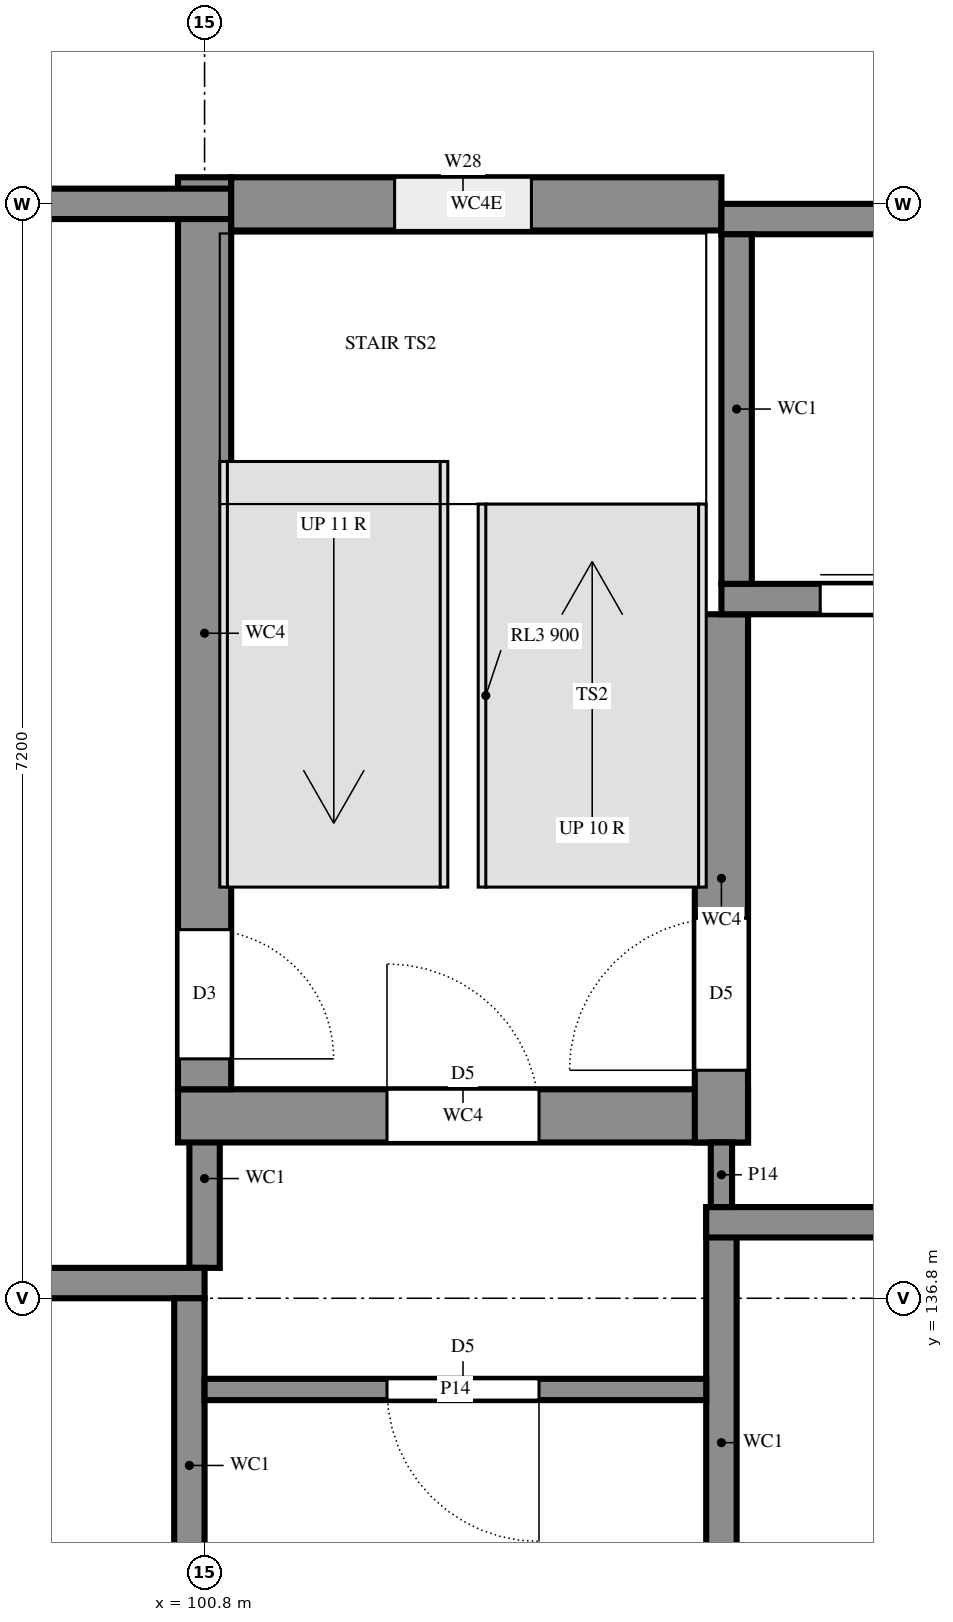
"""IFC4 building model, lengths in metres.
Left out: names, types, materials, properties, quantities, classifications, styles, units other than length and angle.
Written with IfcOpenShell. Run it as: python <this file> out.ifc"""

import sys

from ifc_helpers import new_model, si_unit, direction, frame, frame_2d, origin, place, context, subcontext, project, spatial, rectangle, extrude, element, fill, save


model = new_model("IFC4")
c1 = context("Model", 3, precision=1e-05, world=origin(), true_north=direction((0.0, 1.0)))
c2 = subcontext(c1, "Body", "Model", "MODEL_VIEW")
j1 = project(units=[si_unit("LENGTHUNIT", "METRE"), si_unit("PLANEANGLEUNIT", "RADIAN")], contexts=[c1])
p1 = place(None, origin())
s1 = spatial("IfcSite", under=j1, at=p1, CompositionType="ELEMENT")
p2 = place(p1, origin())
s2 = spatial("IfcBuilding", under=s1, at=p2, CompositionType="ELEMENT")
p3 = place(p2, frame((0.0, 0.0, 10.8)))
s3 = spatial("IfcBuildingStorey", under=s2, at=p3, CompositionType="ELEMENT", Elevation=10.8)
p4 = place(p3, frame((100.8, 137.0, 0.0), z_axis=(0.0, 0.0, 1.0), x_axis=(0.0, 1.0, 0.0)))
e1 = element("IfcWall", 1, at=p4, inside=s3, PredefinedType="SHEAR", context=c2, shape_type="SweptSolid", body=[
    extrude(rectangle(XDim=1.175, YDim=0.2, at=frame_2d((0.587, 0.0))), origin(), (0.0, 0.0, 1.0), 3.6),
])
p5 = place(p3, frame((104.2, 137.4, 0.0), z_axis=(0.0, 0.0, 1.0), x_axis=(0.0, -1.0, 0.0)))
e2 = element("IfcWall", 2, at=p5, inside=s3, PredefinedType="SHEAR", context=c2, shape_type="SweptSolid", body=[
    extrude(rectangle(XDim=3.1, YDim=0.2, at=frame_2d((1.55, 0.0))), origin(), (0.0, 0.0, 1.0), 3.6),
])
p6 = place(p3, frame((108.2, 137.3, 0.0), z_axis=(0.0, 0.0, 1.0), x_axis=(-1.0, 0.0, 0.0)))
e3 = element("IfcWall", 3, at=p6, inside=s3, PredefinedType="SHEAR", context=c2, shape_type="SweptSolid", body=[
    extrude(rectangle(XDim=4.1, YDim=0.2, at=frame_2d((2.05, 0.0))), origin(), (0.0, 0.0, 1.0), 3.6),
])
p7 = place(p3, frame((100.625, 138.0, 0.0), z_axis=(0.0, 0.0, 1.0), x_axis=(1.0, 0.0, 0.0)))
e4 = element("IfcWall", 4, at=p7, inside=s3, PredefinedType="SHEAR", context=c2, shape_type="SweptSolid", body=[
    extrude(rectangle(XDim=3.75, YDim=0.35, at=frame_2d((1.875, 0.0))), origin(), (0.0, 0.0, 1.0), 3.6),
])
p8 = place(p7, frame((1.375, 0.0, 0.0)))
e5 = element("IfcOpeningElement", 5, at=p8, cuts=e4, PredefinedType="OPENING", context=c2, shape_type="SweptSolid", body=[
    extrude(rectangle(XDim=1.0, YDim=2.1, at=frame_2d((0.5, 1.05))), frame((0.0, 0.185, 0.0), z_axis=(0.0, -1.0, 0.0), x_axis=(1.0, 0.0, 0.0)), (0.0, 0.0, 1.0), 0.37),
])
p9 = place(p3, frame((104.2, 137.825, 0.0), z_axis=(0.0, 0.0, 1.0), x_axis=(0.0, 1.0, 0.0)))
e6 = element("IfcWall", 6, at=p9, inside=s3, PredefinedType="SHEAR", context=c2, shape_type="SweptSolid", body=[
    extrude(rectangle(XDim=3.475, YDim=0.35, at=frame_2d((1.738, 0.0))), origin(), (0.0, 0.0, 1.0), 3.6),
])
p10 = place(p9, frame((0.475, 0.0, 0.0)))
e7 = element("IfcOpeningElement", 7, at=p10, cuts=e6, PredefinedType="OPENING", context=c2, shape_type="SweptSolid", body=[
    extrude(rectangle(XDim=1.0, YDim=2.1, at=frame_2d((0.5, 1.05))), frame((0.0, 0.185, 0.0), z_axis=(0.0, -1.0, 0.0), x_axis=(1.0, 0.0, 0.0)), (0.0, 0.0, 1.0), 0.37),
])
p11 = place(p3, frame((100.8, 144.175, 0.0), z_axis=(0.0, 0.0, 1.0), x_axis=(0.0, -1.0, 0.0)))
e8 = element("IfcWall", 8, at=p11, inside=s3, PredefinedType="SHEAR", context=c2, shape_type="SweptSolid", body=[
    extrude(rectangle(XDim=6.0, YDim=0.35, at=frame_2d((3.0, 0.0))), origin(), (0.0, 0.0, 1.0), 3.6),
])
p12 = place(p11, frame((4.95, 0.0, 0.0)))
e9 = element("IfcOpeningElement", 9, at=p12, cuts=e8, PredefinedType="OPENING", context=c2, shape_type="SweptSolid", body=[
    extrude(rectangle(XDim=0.85, YDim=2.1, at=frame_2d((0.425, 1.05))), frame((0.0, 0.185, 0.0), z_axis=(0.0, -1.0, 0.0), x_axis=(1.0, 0.0, 0.0)), (0.0, 0.0, 1.0), 0.37),
])
p13 = place(p3, frame((100.975, 144.0, 0.0), z_axis=(0.0, 0.0, 1.0), x_axis=(-1.0, 0.0, 0.0)))
e10 = element("IfcWall", 10, at=p13, inside=s3, PredefinedType="SHEAR", context=c2, shape_type="SweptSolid", body=[
    extrude(rectangle(XDim=7.575, YDim=0.2, at=frame_2d((3.788, 0.0))), origin(), (0.0, 0.0, 1.0), 3.6),
])
p14 = place(p3, frame((104.2, 144.0, 0.0), z_axis=(0.0, 0.0, 1.0), x_axis=(-1.0, 0.0, 0.0)))
e11 = element("IfcWall", 11, at=p14, inside=s3, PredefinedType="SHEAR", context=c2, shape_type="SweptSolid", body=[
    extrude(rectangle(XDim=3.225, YDim=0.35, at=frame_2d((1.612, 0.0))), origin(), (0.0, 0.0, 1.0), 3.6),
])
p15 = place(p14, frame((1.25, 0.0, 0.6)))
e12 = element("IfcOpeningElement", 12, at=p15, cuts=e11, PredefinedType="OPENING", context=c2, shape_type="SweptSolid", body=[
    extrude(rectangle(XDim=0.9, YDim=2.1, at=frame_2d((0.45, 1.05))), frame((0.0, 0.185, 0.0), z_axis=(0.0, -1.0, 0.0), x_axis=(1.0, 0.0, 0.0)), (0.0, 0.0, 1.0), 0.37),
])
p16 = place(p3, frame((98.4, 136.9, 0.0), z_axis=(0.0, 0.0, 1.0), x_axis=(1.0, 0.0, 0.0)))
e13 = element("IfcWall", 13, at=p16, inside=s3, PredefinedType="SHEAR", context=c2, shape_type="SweptSolid", body=[
    extrude(rectangle(XDim=2.4, YDim=0.2, at=frame_2d((1.2, 0.0))), origin(), (0.0, 0.0, 1.0), 3.6),
])
p17 = place(p3, frame((100.7, 134.6, 0.0), z_axis=(0.0, 0.0, 1.0), x_axis=(0.0, 1.0, 0.0)))
e14 = element("IfcWall", 14, at=p17, inside=s3, PredefinedType="SHEAR", context=c2, shape_type="SweptSolid", body=[
    extrude(rectangle(XDim=2.2, YDim=0.2, at=frame_2d((1.1, 0.0))), origin(), (0.0, 0.0, 1.0), 3.6),
])
p18 = place(p3, frame((104.2, 141.4, 0.0), z_axis=(0.0, 0.0, 1.0), x_axis=(1.0, 0.0, 0.0)))
e15 = element("IfcWall", 15, at=p18, inside=s3, PredefinedType="SHEAR", context=c2, shape_type="SweptSolid", body=[
    extrude(rectangle(XDim=2.4, YDim=0.2, at=frame_2d((1.2, 0.0))), origin(), (0.0, 0.0, 1.0), 3.6),
])
p19 = place(p18, frame((0.65, 0.0, 0.0)))
e16 = element("IfcOpeningElement", 16, at=p19, cuts=e15, PredefinedType="OPENING", context=c2, shape_type="SweptSolid", body=[
    extrude(rectangle(XDim=1.1, YDim=2.1, at=frame_2d((0.55, 1.05))), frame((0.0, 0.11, 0.0), z_axis=(0.0, -1.0, 0.0), x_axis=(1.0, 0.0, 0.0)), (0.0, 0.0, 1.0), 0.22),
])
p20 = place(p3, frame((104.2, 143.9, 0.0), z_axis=(0.0, 0.0, 1.0), x_axis=(1.0, 0.0, 0.0)))
e17 = element("IfcWall", 17, at=p20, inside=s3, PredefinedType="SHEAR", context=c2, shape_type="SweptSolid", body=[
    extrude(rectangle(XDim=2.4, YDim=0.2, at=frame_2d((1.2, 0.0))), origin(), (0.0, 0.0, 1.0), 3.6),
])
p21 = place(p3, frame((104.3, 141.5, 0.0), z_axis=(0.0, 0.0, 1.0), x_axis=(0.0, 1.0, 0.0)))
e18 = element("IfcWall", 18, at=p21, inside=s3, PredefinedType="SHEAR", context=c2, shape_type="SweptSolid", body=[
    extrude(rectangle(XDim=2.3, YDim=0.2, at=frame_2d((1.15, 0.0))), origin(), (0.0, 0.0, 1.0), 3.6),
])
p22 = place(p3, frame((100.8, 136.2, 0.0), z_axis=(0.0, 0.0, 1.0), x_axis=(1.0, 0.0, 0.0)))
e19 = element("IfcWall", 19, at=p22, inside=s3, PredefinedType="PARTITIONING", context=c2, shape_type="SweptSolid", body=[
    extrude(rectangle(XDim=3.3, YDim=0.14, at=frame_2d((1.65, 0.0))), origin(), (0.0, 0.0, 1.0), 3.42),
])
p23 = place(p22, frame((1.2, 0.0, 0.0)))
e20 = element("IfcOpeningElement", 20, at=p23, cuts=e19, PredefinedType="OPENING", context=c2, shape_type="SweptSolid", body=[
    extrude(rectangle(XDim=1.0, YDim=2.1, at=frame_2d((0.5, 1.05))), frame((0.0, 0.08, 0.0), z_axis=(0.0, -1.0, 0.0), x_axis=(1.0, 0.0, 0.0)), (0.0, 0.0, 1.0), 0.16),
])
p24 = place(p3, frame((104.2, 137.4, 0.0), z_axis=(0.0, 0.0, 1.0), x_axis=(0.0, 1.0, 0.0)))
e21 = element("IfcWall", 21, at=p24, inside=s3, PredefinedType="PARTITIONING", context=c2, shape_type="SweptSolid", body=[
    extrude(rectangle(XDim=0.425, YDim=0.14, at=frame_2d((0.212, 0.0))), origin(), (0.0, 0.0, 1.0), 3.42),
])
p25 = place(p15, origin())
e22 = element("IfcWindow", 22, at=p25, inside=s3, PartitioningType="SINGLE_PANEL", PredefinedType="WINDOW", context=c2, shape_type="SweptSolid", body=[
    extrude(rectangle(XDim=0.9, YDim=2.1, at=frame_2d((0.45, 1.05))), frame((0.0, 0.03, 0.0), z_axis=(0.0, -1.0, 0.0), x_axis=(1.0, 0.0, 0.0)), (0.0, 0.0, 1.0), 0.06),
])
fill(e12, e22)
p26 = place(p19, origin())
e23 = element("IfcDoor", 23, at=p26, inside=s3, OperationType="SLIDING_TO_LEFT", PredefinedType="DOOR", context=c2, shape_type="SweptSolid", body=[
    extrude(rectangle(XDim=1.1, YDim=2.1, at=frame_2d((0.55, 1.05))), frame((0.0, 0.025, 0.0), z_axis=(0.0, -1.0, 0.0), x_axis=(1.0, 0.0, 0.0)), (0.0, 0.0, 1.0), 0.05),
])
fill(e16, e23)
p27 = place(p23, frame((1.0, 0.0, 0.0), z_axis=(0.0, 0.0, 1.0), x_axis=(-1.0, 0.0, 0.0)))
e24 = element("IfcDoor", 24, at=p27, inside=s3, OperationType="SINGLE_SWING_RIGHT", PredefinedType="DOOR", context=c2, shape_type="SweptSolid", body=[
    extrude(rectangle(XDim=1.0, YDim=2.1, at=frame_2d((0.5, 1.05))), frame((0.0, 0.025, 0.0), z_axis=(0.0, -1.0, 0.0), x_axis=(1.0, 0.0, 0.0)), (0.0, 0.0, 1.0), 0.05),
])
fill(e20, e24)
p28 = place(p8, origin())
e25 = element("IfcDoor", 25, at=p28, inside=s3, OperationType="SINGLE_SWING_RIGHT", PredefinedType="DOOR", context=c2, shape_type="SweptSolid", body=[
    extrude(rectangle(XDim=1.0, YDim=2.1, at=frame_2d((0.5, 1.05))), frame((0.0, 0.025, 0.0), z_axis=(0.0, -1.0, 0.0), x_axis=(1.0, 0.0, 0.0)), (0.0, 0.0, 1.0), 0.05),
])
fill(e5, e25)
p29 = place(p12, origin())
e26 = element("IfcDoor", 26, at=p29, inside=s3, OperationType="SINGLE_SWING_LEFT", PredefinedType="DOOR", context=c2, shape_type="SweptSolid", body=[
    extrude(rectangle(XDim=0.85, YDim=2.1, at=frame_2d((0.425, 1.05))), frame((0.0, 0.025, 0.0), z_axis=(0.0, -1.0, 0.0), x_axis=(1.0, 0.0, 0.0)), (0.0, 0.0, 1.0), 0.05),
])
fill(e9, e26)
p30 = place(p10, origin())
e27 = element("IfcDoor", 27, at=p30, inside=s3, OperationType="SINGLE_SWING_RIGHT", PredefinedType="DOOR", context=c2, shape_type="SweptSolid", body=[
    extrude(rectangle(XDim=1.0, YDim=2.1, at=frame_2d((0.5, 1.05))), frame((0.0, 0.025, 0.0), z_axis=(0.0, -1.0, 0.0), x_axis=(1.0, 0.0, 0.0)), (0.0, 0.0, 1.0), 0.05),
])
fill(e7, e27)
save(model, sys.argv[1])
